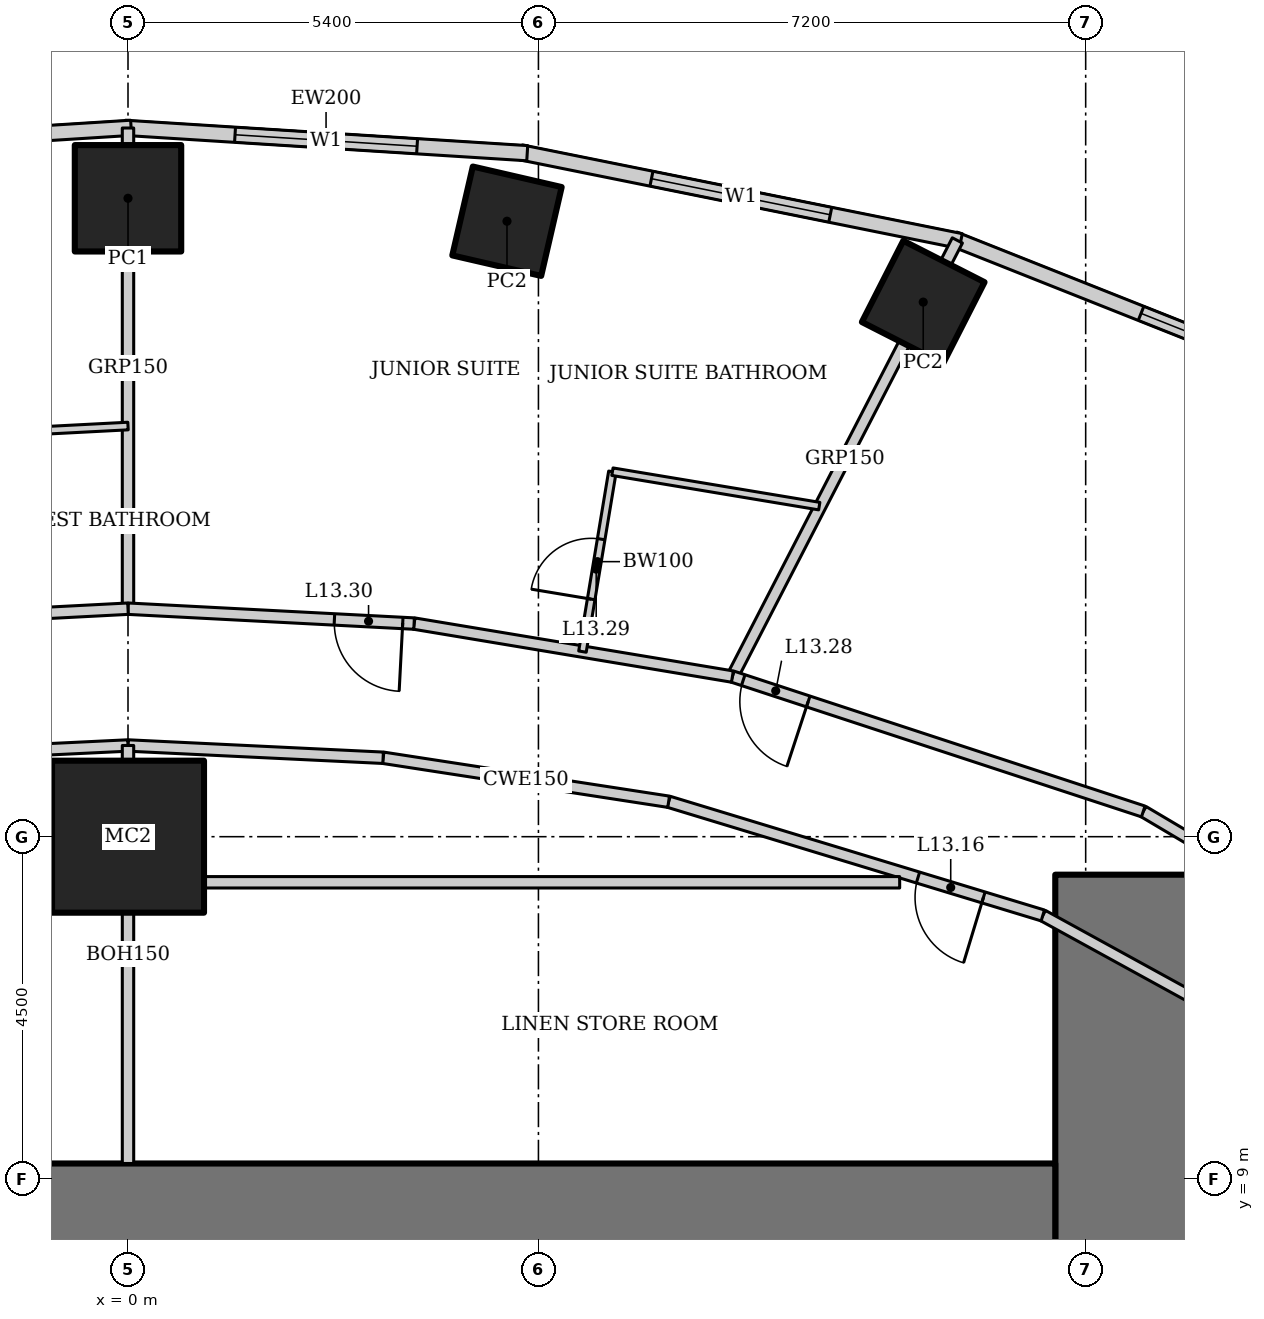
"""IFC4 building model, lengths in metres.
Left out: names, types, materials, properties, quantities, classifications, styles, units other than length and angle.
Written with IfcOpenShell. Run it as: python <this file> out.ifc"""

import sys

from ifc_helpers import new_model, si_unit, direction, frame, frame_2d, origin, origin_2d, place, context, subcontext, project, spatial, rectangle, hollow_rectangle, extrude, element, fill, save


model = new_model("IFC4")
c1 = context("Model", 3, precision=1e-05, world=origin(), true_north=direction((0.0, 1.0)))
c2 = subcontext(c1, "Body", "Model", "MODEL_VIEW")
j1 = project(units=[si_unit("LENGTHUNIT", "METRE"), si_unit("PLANEANGLEUNIT", "RADIAN")], contexts=[c1])
p1 = place(None, origin())
s1 = spatial("IfcSite", under=j1, at=p1, CompositionType="ELEMENT")
p2 = place(p1, origin())
s2 = spatial("IfcBuilding", under=s1, at=p2, CompositionType="ELEMENT")
p3 = place(p2, frame((0.0, 0.0, 62.2)))
s3 = spatial("IfcBuildingStorey", under=s2, at=p3, CompositionType="ELEMENT", Elevation=62.2)
p4 = place(p3, frame((0.0, 13.5, 0.0), z_axis=(0.0, 0.0, 1.0), x_axis=(1.0, 0.0, 0.0)))
e1 = element("IfcColumn", 1, at=p4, inside=s3, PredefinedType="COLUMN", context=c2, shape_type="SweptSolid", body=[
    extrude(hollow_rectangle(XDim=2.0, YDim=2.0, WallThickness=0.17, at=origin_2d()), origin(), (0.0, 0.0, 1.0), 3.6),
])
for number, where, z_axis, x_axis in (
    (2, (10.463, 20.534, 0.0), (0.0, 0.0, 1.0), (0.454, 0.891, 0.0)),
    (3, (4.986, 21.598, 0.0), (0.0, 0.0, 1.0), (0.225, 0.974, 0.0)),
):
    element("IfcColumn", number, at=place(p3, frame(where, z_axis=z_axis, x_axis=x_axis)), inside=s3, PredefinedType="COLUMN", context=c2, shape_type="SweptSolid", body=[
        extrude(hollow_rectangle(XDim=1.2, YDim=1.2, WallThickness=0.1, at=origin_2d()), origin(), (0.0, 0.0, 1.0), 3.6),
    ])
p5 = place(p3, frame((0.0, 21.9, 0.0), z_axis=(0.0, 0.0, 1.0), x_axis=(1.0, 0.0, 0.0)))
e4 = element("IfcColumn", 4, at=p5, inside=s3, PredefinedType="COLUMN", context=c2, shape_type="SweptSolid", body=[
    extrude(hollow_rectangle(XDim=1.4, YDim=1.4, WallThickness=0.1, at=origin_2d()), origin(), (0.0, 0.0, 1.0), 3.6),
])
p6 = place(p3, frame((13.2, -13.0, 0.0), z_axis=(0.0, 0.0, 1.0), x_axis=(0.0, 1.0, 0.0)))
e5 = element("IfcWall", 5, at=p6, inside=s3, PredefinedType="SHEAR", context=c2, shape_type="SweptSolid", body=[
    extrude(rectangle(XDim=26.0, YDim=2.0, at=frame_2d((13.0, 0.0))), origin(), (0.0, 0.0, 1.0), 3.6),
])
p7 = place(p6, frame((12.1, 0.0, 0.0)))
e6 = element("IfcOpeningElement", 6, at=p7, cuts=e5, PredefinedType="OPENING", context=c2, shape_type="SweptSolid", body=[
    extrude(rectangle(XDim=1.8, YDim=2.1, at=frame_2d((0.9, 1.05))), frame((0.0, 1.01, 0.0), z_axis=(0.0, -1.0, 0.0), x_axis=(1.0, 0.0, 0.0)), (0.0, 0.0, 1.0), 2.02),
])
p8 = place(p3, frame((12.2, 8.0, 0.0), z_axis=(0.0, 0.0, 1.0), x_axis=(-1.0, 0.0, 0.0)))
e7 = element("IfcWall", 7, at=p8, inside=s3, PredefinedType="SHEAR", context=c2, shape_type="SweptSolid", body=[
    extrude(rectangle(XDim=24.4, YDim=2.4, at=frame_2d((12.2, 0.0))), origin(), (0.0, 0.0, 1.0), 3.6),
])
p9 = place(p3, frame((18.018, 18.523, 0.0), z_axis=(0.0, 0.0, 1.0), x_axis=(-0.929358351251, 0.369178892895, 0.0)))
e8 = element("IfcWall", 8, at=p9, inside=s3, PredefinedType="SOLIDWALL", context=c2, shape_type="SweptSolid", body=[
    extrude(rectangle(XDim=7.692, YDim=0.2, at=frame_2d((3.846, 0.0))), origin(), (0.0, 0.0, 1.0), 3.45),
])
p10 = place(p9, frame((2.646, 0.0, 0.5)))
e9 = element("IfcOpeningElement", 9, at=p10, cuts=e8, PredefinedType="OPENING", context=c2, shape_type="SweptSolid", body=[
    extrude(rectangle(XDim=2.4, YDim=2.2, at=frame_2d((1.2, 1.1))), frame((0.0, 0.11, 0.0), z_axis=(0.0, -1.0, 0.0), x_axis=(1.0, 0.0, 0.0)), (0.0, 0.0, 1.0), 0.22),
])
p11 = place(p3, frame((10.957, 21.337, 0.0), z_axis=(0.0, 0.0, 1.0), x_axis=(-0.980251657452, 0.197754110105, 0.0)))
e10 = element("IfcWall", 10, at=p11, inside=s3, PredefinedType="SOLIDWALL", context=c2, shape_type="SweptSolid", body=[
    extrude(rectangle(XDim=5.904, YDim=0.2, at=frame_2d((2.952, 0.0))), origin(), (0.0, 0.0, 1.0), 3.45),
])
p12 = place(p11, frame((1.752, 0.0, 0.5)))
e11 = element("IfcOpeningElement", 11, at=p12, cuts=e10, PredefinedType="OPENING", context=c2, shape_type="SweptSolid", body=[
    extrude(rectangle(XDim=2.4, YDim=2.2, at=frame_2d((1.2, 1.1))), frame((0.0, 0.11, 0.0), z_axis=(0.0, -1.0, 0.0), x_axis=(1.0, 0.0, 0.0)), (0.0, 0.0, 1.0), 0.22),
])
p13 = place(p3, frame((5.253, 22.493, 0.0), z_axis=(0.0, 0.0, 1.0), x_axis=(-0.998018582375, 0.062919863585, 0.0)))
e12 = element("IfcWall", 12, at=p13, inside=s3, PredefinedType="SOLIDWALL", context=c2, shape_type="SweptSolid", body=[
    extrude(rectangle(XDim=5.304, YDim=0.2, at=frame_2d((2.652, 0.0))), origin(), (0.0, 0.0, 1.0), 3.45),
])
p14 = place(p13, frame((1.452, 0.0, 0.5)))
e13 = element("IfcOpeningElement", 13, at=p14, cuts=e12, PredefinedType="OPENING", context=c2, shape_type="SweptSolid", body=[
    extrude(rectangle(XDim=2.4, YDim=2.2, at=frame_2d((1.2, 1.1))), frame((0.0, 0.11, 0.0), z_axis=(0.0, -1.0, 0.0), x_axis=(1.0, 0.0, 0.0)), (0.0, 0.0, 1.0), 0.22),
])
p15 = place(p3, frame((0.041, 22.827, 0.0), z_axis=(0.0, 0.0, 1.0), x_axis=(-0.998018582375, -0.062919863585, 0.0)))
e14 = element("IfcWall", 14, at=p15, inside=s3, PredefinedType="SOLIDWALL", context=c2, shape_type="SweptSolid", body=[
    extrude(rectangle(XDim=5.304, YDim=0.2, at=frame_2d((2.652, 0.0))), origin(), (0.0, 0.0, 1.0), 3.45),
])
p16 = place(p15, frame((1.452, 0.0, 0.5)))
e15 = element("IfcOpeningElement", 15, at=p16, cuts=e14, PredefinedType="OPENING", context=c2, shape_type="SweptSolid", body=[
    extrude(rectangle(XDim=2.4, YDim=2.2, at=frame_2d((1.2, 1.1))), frame((0.0, 0.11, 0.0), z_axis=(0.0, -1.0, 0.0), x_axis=(1.0, 0.0, 0.0)), (0.0, 0.0, 1.0), 0.22),
])
p17 = place(p3, frame((10.912, 21.346, 0.0), z_axis=(0.0, 0.0, 1.0), x_axis=(-0.458384799126, -0.888753833145, 0.0)))
e16 = element("IfcWall", 16, at=p17, inside=s3, PredefinedType="PARTITIONING", context=c2, shape_type="SweptSolid", body=[
    extrude(rectangle(XDim=6.457, YDim=0.15, at=frame_2d((3.229, 0.0))), origin(), (0.0, 0.0, 1.0), 2.528),
])
p18 = place(p3, frame((0.0, 22.825, 0.0), z_axis=(0.0, 0.0, 1.0), x_axis=(0.0, -1.0, 0.0)))
e17 = element("IfcWall", 17, at=p18, inside=s3, PredefinedType="PARTITIONING", context=c2, shape_type="SweptSolid", body=[
    extrude(rectangle(XDim=6.325, YDim=0.15, at=frame_2d((3.162, 0.0))), origin(), (0.0, 0.0, 1.0), 2.924),
])
p19 = place(p3, frame((18.681, 10.675, 0.0), z_axis=(0.0, 0.0, 1.0), x_axis=(-0.860147339762, 0.510045639036, 0.0)))
e18 = element("IfcWall", 18, at=p19, inside=s3, PredefinedType="PARTITIONING", context=c2, shape_type="SweptSolid", body=[
    extrude(rectangle(XDim=6.19, YDim=0.15, at=frame_2d((3.095, 0.0))), origin(), (0.0, 0.0, 1.0), 3.45),
])
p20 = place(p3, frame((13.357, 13.832, 0.0), z_axis=(0.0, 0.0, 1.0), x_axis=(-0.950106803111, 0.311924770869, 0.0)))
e19 = element("IfcWall", 19, at=p20, inside=s3, PredefinedType="PARTITIONING", context=c2, shape_type="SweptSolid", body=[
    extrude(rectangle(XDim=5.689, YDim=0.15, at=frame_2d((2.845, 0.0))), origin(), (0.0, 0.0, 1.0), 3.45),
])
p21 = place(p20, frame((4.639, 0.0, 0.0)))
e20 = element("IfcOpeningElement", 20, at=p21, cuts=e19, PredefinedType="OPENING", context=c2, shape_type="SweptSolid", body=[
    extrude(rectangle(XDim=0.9, YDim=2.1, at=frame_2d((0.45, 1.05))), frame((0.0, 0.085, 0.0), z_axis=(0.0, -1.0, 0.0), x_axis=(1.0, 0.0, 0.0)), (0.0, 0.0, 1.0), 0.17),
])
p22 = place(p3, frame((7.952, 15.607, 0.0), z_axis=(0.0, 0.0, 1.0), x_axis=(-0.98641101506, 0.164296407044, 0.0)))
e21 = element("IfcWall", 21, at=p22, inside=s3, PredefinedType="PARTITIONING", context=c2, shape_type="SweptSolid", body=[
    extrude(rectangle(XDim=4.245, YDim=0.15, at=frame_2d((2.123, 0.0))), origin(), (0.0, 0.0, 1.0), 3.45),
])
p23 = place(p3, frame((3.764, 16.304, 0.0), z_axis=(0.0, 0.0, 1.0), x_axis=(-0.998649848759, 0.05194689186, 0.0)))
e22 = element("IfcWall", 22, at=p23, inside=s3, PredefinedType="PARTITIONING", context=c2, shape_type="SweptSolid", body=[
    extrude(rectangle(XDim=3.769, YDim=0.15, at=frame_2d((1.885, 0.0))), origin(), (0.0, 0.0, 1.0), 3.45),
])
p24 = place(p23, frame((0.15, 0.0, 0.0)))
e23 = element("IfcOpeningElement", 23, at=p24, cuts=e22, PredefinedType="OPENING", context=c2, shape_type="SweptSolid", body=[
    extrude(rectangle(XDim=0.9, YDim=2.1, at=frame_2d((0.45, 1.05))), frame((0.0, 0.085, 0.0), z_axis=(0.0, -1.0, 0.0), x_axis=(1.0, 0.0, 0.0)), (0.0, 0.0, 1.0), 0.17),
])
p25 = place(p3, frame((0.0, 16.5, 0.0), z_axis=(0.0, 0.0, 1.0), x_axis=(-0.998649848759, -0.05194689186, 0.0)))
e24 = element("IfcWall", 24, at=p25, inside=s3, PredefinedType="PARTITIONING", context=c2, shape_type="SweptSolid", body=[
    extrude(rectangle(XDim=3.769, YDim=0.15, at=frame_2d((1.885, 0.0))), origin(), (0.0, 0.0, 1.0), 3.45),
])
p26 = place(p25, frame((2.719, 0.0, 0.0)))
e25 = element("IfcOpeningElement", 25, at=p26, cuts=e24, PredefinedType="OPENING", context=c2, shape_type="SweptSolid", body=[
    extrude(rectangle(XDim=0.9, YDim=2.1, at=frame_2d((0.45, 1.05))), frame((0.0, 0.085, 0.0), z_axis=(0.0, -1.0, 0.0), x_axis=(1.0, 0.0, 0.0)), (0.0, 0.0, 1.0), 0.17),
])
p27 = place(p3, frame((17.021, 9.726, 0.0), z_axis=(0.0, 0.0, 1.0), x_axis=(-0.876522084062, 0.481361647986, 0.0)))
e26 = element("IfcWall", 26, at=p27, inside=s3, PredefinedType="PARTITIONING", context=c2, shape_type="SweptSolid", body=[
    extrude(rectangle(XDim=5.687, YDim=0.15, at=frame_2d((2.844, 0.0))), origin(), (0.0, 0.0, 1.0), 3.45),
])
p28 = place(p3, frame((12.036, 12.464, 0.0), z_axis=(0.0, 0.0, 1.0), x_axis=(-0.956795045135, 0.290763205385, 0.0)))
e27 = element("IfcWall", 27, at=p28, inside=s3, PredefinedType="PARTITIONING", context=c2, shape_type="SweptSolid", body=[
    extrude(rectangle(XDim=5.146, YDim=0.15, at=frame_2d((2.573, 0.0))), origin(), (0.0, 0.0, 1.0), 3.45),
])
p29 = place(p28, frame((0.816, 0.0, 0.0)))
e28 = element("IfcOpeningElement", 28, at=p29, cuts=e27, PredefinedType="OPENING", context=c2, shape_type="SweptSolid", body=[
    extrude(rectangle(XDim=0.9, YDim=2.1, at=frame_2d((0.45, 1.05))), frame((0.0, 0.085, 0.0), z_axis=(0.0, -1.0, 0.0), x_axis=(1.0, 0.0, 0.0)), (0.0, 0.0, 1.0), 0.17),
])
p30 = place(p3, frame((7.113, 13.96, 0.0), z_axis=(0.0, 0.0, 1.0), x_axis=(-0.988343461108, 0.152240608529, 0.0)))
e29 = element("IfcWall", 29, at=p30, inside=s3, PredefinedType="PARTITIONING", context=c2, shape_type="SweptSolid", body=[
    extrude(rectangle(XDim=3.801, YDim=0.15, at=frame_2d((1.9, 0.0))), origin(), (0.0, 0.0, 1.0), 3.45),
])
p31 = place(p3, frame((3.356, 14.538, 0.0), z_axis=(0.0, 0.0, 1.0), x_axis=(-0.998842682549, 0.048096730859, 0.0)))
e30 = element("IfcWall", 30, at=p31, inside=s3, PredefinedType="PARTITIONING", context=c2, shape_type="SweptSolid", body=[
    extrude(rectangle(XDim=3.36, YDim=0.15, at=frame_2d((1.68, 0.0))), origin(), (0.0, 0.0, 1.0), 3.45),
])
p32 = place(p3, frame((0.0, 14.7, 0.0), z_axis=(0.0, 0.0, 1.0), x_axis=(-0.998842682549, -0.048096730859, 0.0)))
e31 = element("IfcWall", 31, at=p32, inside=s3, PredefinedType="PARTITIONING", context=c2, shape_type="SweptSolid", body=[
    extrude(rectangle(XDim=3.36, YDim=0.15, at=frame_2d((1.68, 0.0))), origin(), (0.0, 0.0, 1.0), 3.45),
])
p33 = place(p32, frame((2.177, 0.0, 0.0)))
e32 = element("IfcOpeningElement", 32, at=p33, cuts=e31, PredefinedType="OPENING", context=c2, shape_type="SweptSolid", body=[
    extrude(rectangle(XDim=1.0, YDim=2.1, at=frame_2d((0.5, 1.05))), frame((0.0, 0.085, 0.0), z_axis=(0.0, -1.0, 0.0), x_axis=(1.0, 0.0, 0.0)), (0.0, 0.0, 1.0), 0.17),
])
p34 = place(p3, frame((0.0, 9.2, 0.0), z_axis=(0.0, 0.0, 1.0), x_axis=(0.0, 1.0, 0.0)))
e33 = element("IfcWall", 33, at=p34, inside=s3, PredefinedType="PARTITIONING", context=c2, shape_type="SweptSolid", body=[
    extrude(rectangle(XDim=5.5, YDim=0.15, at=frame_2d((2.75, 0.0))), origin(), (0.0, 0.0, 1.0), 2.924),
])
p35 = place(p3, frame((10.153, 12.9, 0.0), z_axis=(0.0, 0.0, 1.0), x_axis=(-1.0, 0.0, 0.0)))
e34 = element("IfcWall", 34, at=p35, inside=s3, PredefinedType="PARTITIONING", context=c2, shape_type="SweptSolid", body=[
    extrude(rectangle(XDim=10.153, YDim=0.15, at=frame_2d((5.076, 0.0))), origin(), (0.0, 0.0, 1.0), 3.45),
])
p36 = place(p3, frame((5.979, 15.935, 0.0), z_axis=(0.0, 0.0, 1.0), x_axis=(0.164283516215, 0.986413162067, 0.0)))
e35 = element("IfcWall", 35, at=p36, inside=s3, PredefinedType="PARTITIONING", context=c2, shape_type="SweptSolid", body=[
    extrude(rectangle(XDim=2.4, YDim=0.1, at=frame_2d((1.2, 0.0))), origin(), (0.0, 0.0, 1.0), 2.914),
])
p37 = place(p36, frame((0.7, 0.0, 0.0)))
e36 = element("IfcOpeningElement", 36, at=p37, cuts=e35, PredefinedType="OPENING", context=c2, shape_type="SweptSolid", body=[
    extrude(rectangle(XDim=0.8, YDim=2.1, at=frame_2d((0.4, 1.05))), frame((0.0, 0.06, 0.0), z_axis=(0.0, -1.0, 0.0), x_axis=(1.0, 0.0, 0.0)), (0.0, 0.0, 1.0), 0.12),
])
p38 = place(p3, frame((6.374, 18.303, 0.0), z_axis=(0.0, 0.0, 1.0), x_axis=(0.98640348956, -0.164341582641, 0.0)))
e37 = element("IfcWall", 37, at=p38, inside=s3, PredefinedType="PARTITIONING", context=c2, shape_type="SweptSolid", body=[
    extrude(rectangle(XDim=2.759, YDim=0.1, at=frame_2d((1.379, 0.0))), origin(), (0.0, 0.0, 1.0), 3.45),
])
p39 = place(p3, frame((-2.122, 18.793, 0.0), z_axis=(0.0, 0.0, 1.0), x_axis=(0.998644675281, 0.052046253785, 0.0)))
e38 = element("IfcWall", 38, at=p39, inside=s3, PredefinedType="PARTITIONING", context=c2, shape_type="SweptSolid", body=[
    extrude(rectangle(XDim=2.125, YDim=0.1, at=frame_2d((1.062, 0.0))), origin(), (0.0, 0.0, 1.0), 3.45),
])
p40 = place(p10, origin())
e39 = element("IfcWindow", 39, at=p40, inside=s3, PartitioningType="SINGLE_PANEL", PredefinedType="WINDOW", context=c2, shape_type="SweptSolid", body=[
    extrude(rectangle(XDim=2.4, YDim=2.2, at=frame_2d((1.2, 1.1))), frame((0.0, 0.03, 0.0), z_axis=(0.0, -1.0, 0.0), x_axis=(1.0, 0.0, 0.0)), (0.0, 0.0, 1.0), 0.06),
])
fill(e9, e39)
p41 = place(p12, origin())
e40 = element("IfcWindow", 40, at=p41, inside=s3, PartitioningType="SINGLE_PANEL", PredefinedType="WINDOW", context=c2, shape_type="SweptSolid", body=[
    extrude(rectangle(XDim=2.4, YDim=2.2, at=frame_2d((1.2, 1.1))), frame((0.0, 0.03, 0.0), z_axis=(0.0, -1.0, 0.0), x_axis=(1.0, 0.0, 0.0)), (0.0, 0.0, 1.0), 0.06),
])
fill(e11, e40)
p42 = place(p14, origin())
e41 = element("IfcWindow", 41, at=p42, inside=s3, PartitioningType="SINGLE_PANEL", PredefinedType="WINDOW", context=c2, shape_type="SweptSolid", body=[
    extrude(rectangle(XDim=2.4, YDim=2.2, at=frame_2d((1.2, 1.1))), frame((0.0, 0.03, 0.0), z_axis=(0.0, -1.0, 0.0), x_axis=(1.0, 0.0, 0.0)), (0.0, 0.0, 1.0), 0.06),
])
fill(e13, e41)
p43 = place(p29, origin())
e42 = element("IfcDoor", 42, at=p43, inside=s3, OperationType="SINGLE_SWING_LEFT", PredefinedType="DOOR", context=c2, shape_type="SweptSolid", body=[
    extrude(rectangle(XDim=0.9, YDim=2.1, at=frame_2d((0.45, 1.05))), frame((0.0, 0.025, 0.0), z_axis=(0.0, -1.0, 0.0), x_axis=(1.0, 0.0, 0.0)), (0.0, 0.0, 1.0), 0.05),
])
fill(e28, e42)
p44 = place(p21, origin())
e43 = element("IfcDoor", 43, at=p44, inside=s3, OperationType="SINGLE_SWING_LEFT", PredefinedType="DOOR", context=c2, shape_type="SweptSolid", body=[
    extrude(rectangle(XDim=0.9, YDim=2.1, at=frame_2d((0.45, 1.05))), frame((0.0, 0.025, 0.0), z_axis=(0.0, -1.0, 0.0), x_axis=(1.0, 0.0, 0.0)), (0.0, 0.0, 1.0), 0.05),
])
fill(e20, e43)
p45 = place(p37, origin())
e44 = element("IfcDoor", 44, at=p45, inside=s3, OperationType="SINGLE_SWING_LEFT", PredefinedType="DOOR", context=c2, shape_type="SweptSolid", body=[
    extrude(rectangle(XDim=0.8, YDim=2.1, at=frame_2d((0.4, 1.05))), frame((0.0, 0.025, 0.0), z_axis=(0.0, -1.0, 0.0), x_axis=(1.0, 0.0, 0.0)), (0.0, 0.0, 1.0), 0.05),
])
fill(e36, e44)
p46 = place(p24, origin())
e45 = element("IfcDoor", 45, at=p46, inside=s3, OperationType="SINGLE_SWING_LEFT", PredefinedType="DOOR", context=c2, shape_type="SweptSolid", body=[
    extrude(rectangle(XDim=0.9, YDim=2.1, at=frame_2d((0.45, 1.05))), frame((0.0, 0.025, 0.0), z_axis=(0.0, -1.0, 0.0), x_axis=(1.0, 0.0, 0.0)), (0.0, 0.0, 1.0), 0.05),
])
fill(e23, e45)
save(model, sys.argv[1])
